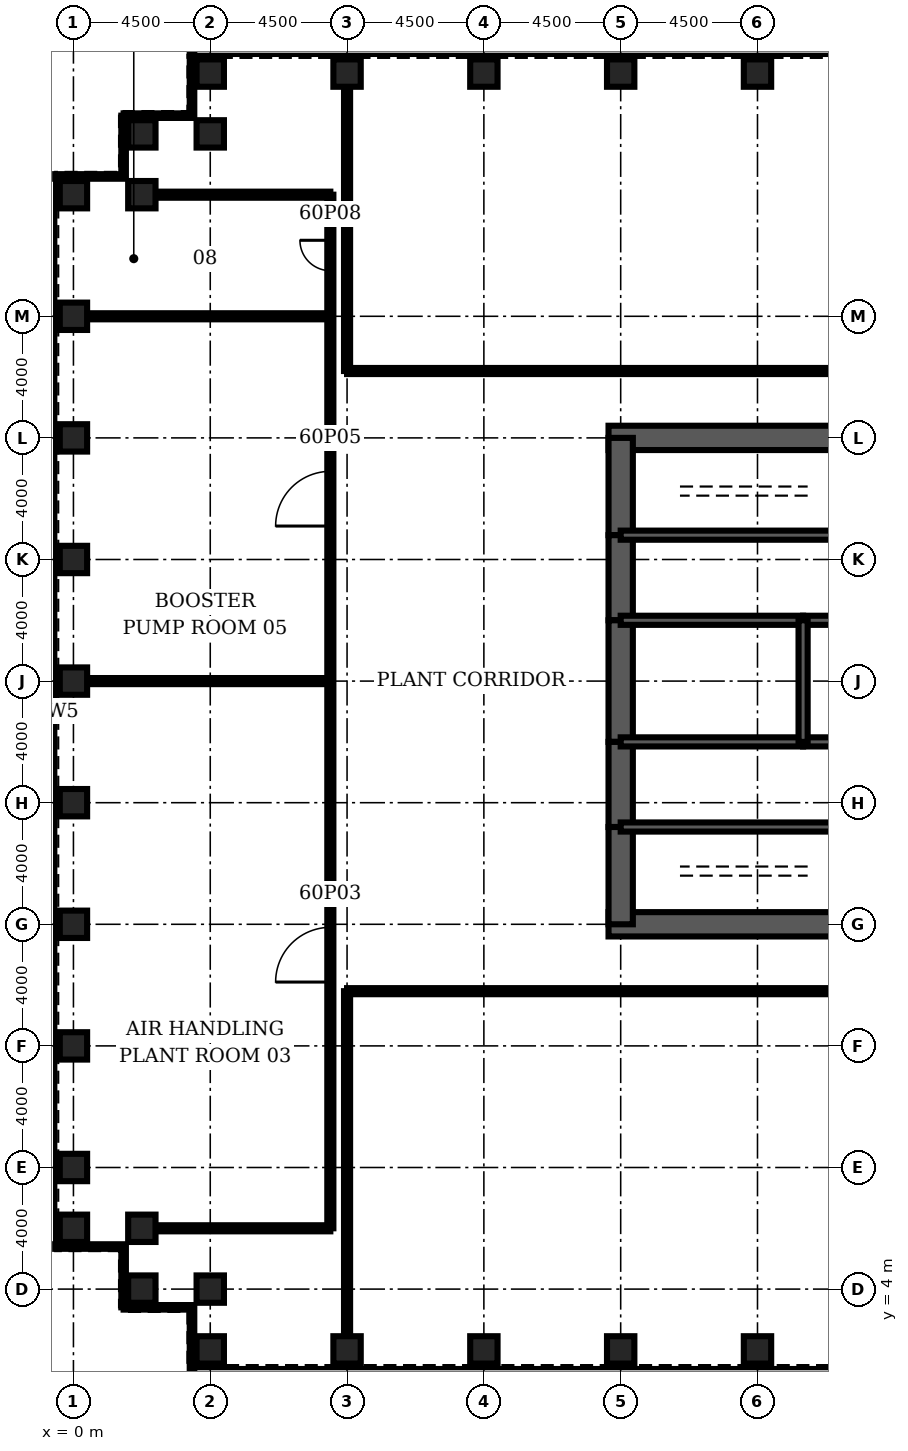
"""IFC4 building model, lengths in metres.
Left out: names, types, materials, properties, quantities, classifications, styles, units other than length and angle.
Written with IfcOpenShell. Run it as: python <this file> out.ifc"""

import sys

from ifc_helpers import new_model, si_unit, direction, frame, frame_2d, origin, origin_2d, place, context, subcontext, project, spatial, rectangle, hollow_rectangle, extrude, element, fill, save


model = new_model("IFC4")
c1 = context("Model", 3, precision=1e-05, world=origin(), true_north=direction((0.0, 1.0)))
c2 = subcontext(c1, "Body", "Model", "MODEL_VIEW")
j1 = project(units=[si_unit("LENGTHUNIT", "METRE"), si_unit("PLANEANGLEUNIT", "RADIAN")], contexts=[c1])
p1 = place(None, origin())
s1 = spatial("IfcSite", under=j1, at=p1, CompositionType="ELEMENT")
p2 = place(p1, origin())
s2 = spatial("IfcBuilding", under=s1, at=p2, CompositionType="ELEMENT")
p3 = place(p2, frame((0.0, 0.0, 265.6)))
s3 = spatial("IfcBuildingStorey", under=s2, at=p3, CompositionType="ELEMENT", Elevation=265.6)
for number, where, z_axis, x_axis in (
    (1, (4.5, 2.0, 0.0), (0.0, 0.0, 1.0), (0.0, 1.0, 0.0)),
    (2, (9.0, 2.0, 0.0), (0.0, 0.0, 1.0), (0.0, 1.0, 0.0)),
    (3, (13.5, 2.0, 0.0), (0.0, 0.0, 1.0), (0.0, 1.0, 0.0)),
    (4, (18.0, 2.0, 0.0), (0.0, 0.0, 1.0), (0.0, 1.0, 0.0)),
    (5, (22.5, 2.0, 0.0), (0.0, 0.0, 1.0), (0.0, 1.0, 0.0)),
    (6, (22.5, 44.0, 0.0), (0.0, 0.0, 1.0), (0.0, 1.0, 0.0)),
    (7, (18.0, 44.0, 0.0), (0.0, 0.0, 1.0), (0.0, 1.0, 0.0)),
    (8, (13.5, 44.0, 0.0), (0.0, 0.0, 1.0), (0.0, 1.0, 0.0)),
    (9, (9.0, 44.0, 0.0), (0.0, 0.0, 1.0), (0.0, 1.0, 0.0)),
    (10, (4.5, 44.0, 0.0), (0.0, 0.0, 1.0), (0.0, 1.0, 0.0)),
    (11, (4.5, 42.0, 0.0), (0.0, 0.0, 1.0), (0.0, 1.0, 0.0)),
    (12, (2.25, 42.0, 0.0), (0.0, 0.0, 1.0), (1.0, 0.0, 0.0)),
    (13, (2.25, 40.0, 0.0), (0.0, 0.0, 1.0), (1.0, 0.0, 0.0)),
    (14, (0.0, 40.0, 0.0), (0.0, 0.0, 1.0), (1.0, 0.0, 0.0)),
    (15, (0.0, 36.0, 0.0), (0.0, 0.0, 1.0), (1.0, 0.0, 0.0)),
    (16, (0.0, 32.0, 0.0), (0.0, 0.0, 1.0), (1.0, 0.0, 0.0)),
    (17, (0.0, 28.0, 0.0), (0.0, 0.0, 1.0), (1.0, 0.0, 0.0)),
    (18, (0.0, 24.0, 0.0), (0.0, 0.0, 1.0), (1.0, 0.0, 0.0)),
    (19, (0.0, 20.0, 0.0), (0.0, 0.0, 1.0), (1.0, 0.0, 0.0)),
    (20, (0.0, 16.0, 0.0), (0.0, 0.0, 1.0), (1.0, 0.0, 0.0)),
    (21, (0.0, 12.0, 0.0), (0.0, 0.0, 1.0), (1.0, 0.0, 0.0)),
    (22, (0.0, 8.0, 0.0), (0.0, 0.0, 1.0), (1.0, 0.0, 0.0)),
    (23, (0.0, 6.0, 0.0), (0.0, 0.0, 1.0), (1.0, 0.0, 0.0)),
    (24, (2.25, 6.0, 0.0), (0.0, 0.0, 1.0), (1.0, 0.0, 0.0)),
    (25, (2.25, 4.0, 0.0), (0.0, 0.0, 1.0), (1.0, 0.0, 0.0)),
    (26, (4.5, 4.0, 0.0), (0.0, 0.0, 1.0), (0.0, 1.0, 0.0)),
):
    element("IfcColumn", number, at=place(p3, frame(where, z_axis=z_axis, x_axis=x_axis)), inside=s3, PredefinedType="COLUMN", context=c2, shape_type="SweptSolid", body=[
        extrude(hollow_rectangle(XDim=0.9, YDim=0.9, WallThickness=0.07, at=origin_2d()), origin(), (0.0, 0.0, 1.0), 5.5),
    ])
for number, where, z_axis, x_axis in (
    (27, (17.6, 16.0, 0.0), (0.0, 0.0, 1.0), (1.0, 0.0, 0.0)),
    (28, (27.0, 32.0, 0.0), (0.0, 0.0, 1.0), (-1.0, 0.0, 0.0)),
):
    element("IfcWall", number, at=place(p3, frame(where, z_axis=z_axis, x_axis=x_axis)), inside=s3, PredefinedType="SHEAR", context=c2, shape_type="SweptSolid", body=[
        extrude(rectangle(XDim=9.4, YDim=0.8, at=frame_2d((4.7, 0.0))), origin(), (0.0, 0.0, 1.0), 5.5),
    ])
p4 = place(p3, frame((18.0, 32.0, 0.0), z_axis=(0.0, 0.0, 1.0), x_axis=(0.0, -1.0, 0.0)))
e29 = element("IfcWall", 29, at=p4, inside=s3, PredefinedType="SHEAR", context=c2, shape_type="SweptSolid", body=[
    extrude(rectangle(XDim=3.2, YDim=0.8, at=frame_2d((1.6, 0.0))), origin(), (0.0, 0.0, 1.0), 5.5),
])
p5 = place(p3, frame((18.0, 28.8, 0.0), z_axis=(0.0, 0.0, 1.0), x_axis=(0.0, -1.0, 0.0)))
e30 = element("IfcWall", 30, at=p5, inside=s3, PredefinedType="SHEAR", context=c2, shape_type="SweptSolid", body=[
    extrude(rectangle(XDim=2.8, YDim=0.8, at=frame_2d((1.4, 0.0))), origin(), (0.0, 0.0, 1.0), 5.5),
])
p6 = place(p5, frame((0.4, 0.0, 0.0)))
e31 = element("IfcOpeningElement", 31, at=p6, cuts=e30, PredefinedType="OPENING", context=c2, shape_type="SweptSolid", body=[
    extrude(rectangle(XDim=1.8, YDim=2.1, at=frame_2d((0.9, 1.05))), frame((0.0, 0.41, 0.0), z_axis=(0.0, -1.0, 0.0), x_axis=(1.0, 0.0, 0.0)), (0.0, 0.0, 1.0), 0.82),
])
p7 = place(p3, frame((18.0, 26.0, 0.0), z_axis=(0.0, 0.0, 1.0), x_axis=(0.0, -1.0, 0.0)))
e32 = element("IfcWall", 32, at=p7, inside=s3, PredefinedType="SHEAR", context=c2, shape_type="SweptSolid", body=[
    extrude(rectangle(XDim=4.0, YDim=0.8, at=frame_2d((2.0, 0.0))), origin(), (0.0, 0.0, 1.0), 5.5),
])
p8 = place(p3, frame((18.0, 22.0, 0.0), z_axis=(0.0, 0.0, 1.0), x_axis=(0.0, -1.0, 0.0)))
e33 = element("IfcWall", 33, at=p8, inside=s3, PredefinedType="SHEAR", context=c2, shape_type="SweptSolid", body=[
    extrude(rectangle(XDim=2.8, YDim=0.8, at=frame_2d((1.4, 0.0))), origin(), (0.0, 0.0, 1.0), 5.5),
])
p9 = place(p8, frame((0.6, 0.0, 0.0)))
e34 = element("IfcOpeningElement", 34, at=p9, cuts=e33, PredefinedType="OPENING", context=c2, shape_type="SweptSolid", body=[
    extrude(rectangle(XDim=1.8, YDim=2.1, at=frame_2d((0.9, 1.05))), frame((0.0, 0.41, 0.0), z_axis=(0.0, -1.0, 0.0), x_axis=(1.0, 0.0, 0.0)), (0.0, 0.0, 1.0), 0.82),
])
p10 = place(p3, frame((18.0, 19.2, 0.0), z_axis=(0.0, 0.0, 1.0), x_axis=(0.0, -1.0, 0.0)))
e35 = element("IfcWall", 35, at=p10, inside=s3, PredefinedType="SHEAR", context=c2, shape_type="SweptSolid", body=[
    extrude(rectangle(XDim=3.2, YDim=0.8, at=frame_2d((1.6, 0.0))), origin(), (0.0, 0.0, 1.0), 5.5),
])
p11 = place(p3, frame((18.0, 19.2, 0.0), z_axis=(0.0, 0.0, 1.0), x_axis=(1.0, 0.0, 0.0)))
e36 = element("IfcWall", 36, at=p11, inside=s3, PredefinedType="SOLIDWALL", context=c2, shape_type="SweptSolid", body=[
    extrude(rectangle(XDim=9.0, YDim=0.3, at=frame_2d((4.5, 0.0))), origin(), (0.0, 0.0, 1.0), 5.5),
])
p12 = place(p11, frame((0.65, 0.0, 0.0)))
e37 = element("IfcOpeningElement", 37, at=p12, cuts=e36, PredefinedType="OPENING", context=c2, shape_type="SweptSolid", body=[
    extrude(rectangle(XDim=1.0, YDim=2.1, at=frame_2d((0.5, 1.05))), frame((0.0, 0.16, 0.0), z_axis=(0.0, -1.0, 0.0), x_axis=(1.0, 0.0, 0.0)), (0.0, 0.0, 1.0), 0.32),
])
p13 = place(p3, frame((18.0, 28.8, 0.0), z_axis=(0.0, 0.0, 1.0), x_axis=(1.0, 0.0, 0.0)))
e38 = element("IfcWall", 38, at=p13, inside=s3, PredefinedType="SOLIDWALL", context=c2, shape_type="SweptSolid", body=[
    extrude(rectangle(XDim=9.0, YDim=0.3, at=frame_2d((4.5, 0.0))), origin(), (0.0, 0.0, 1.0), 5.5),
])
p14 = place(p13, frame((0.65, 0.0, 0.0)))
e39 = element("IfcOpeningElement", 39, at=p14, cuts=e38, PredefinedType="OPENING", context=c2, shape_type="SweptSolid", body=[
    extrude(rectangle(XDim=1.0, YDim=2.1, at=frame_2d((0.5, 1.05))), frame((0.0, 0.16, 0.0), z_axis=(0.0, -1.0, 0.0), x_axis=(1.0, 0.0, 0.0)), (0.0, 0.0, 1.0), 0.32),
])
p15 = place(p3, frame((18.0, 22.0, 0.0), z_axis=(0.0, 0.0, 1.0), x_axis=(1.0, 0.0, 0.0)))
e40 = element("IfcWall", 40, at=p15, inside=s3, PredefinedType="SOLIDWALL", context=c2, shape_type="SweptSolid", body=[
    extrude(rectangle(XDim=6.0, YDim=0.3, at=frame_2d((3.0, 0.0))), origin(), (0.0, 0.0, 1.0), 5.5),
])
p16 = place(p15, frame((2.0, 0.0, 0.0)))
e41 = element("IfcOpeningElement", 41, at=p16, cuts=e40, PredefinedType="OPENING", context=c2, shape_type="SweptSolid", body=[
    extrude(rectangle(XDim=1.0, YDim=2.1, at=frame_2d((0.5, 1.05))), frame((0.0, 0.16, 0.0), z_axis=(0.0, -1.0, 0.0), x_axis=(1.0, 0.0, 0.0)), (0.0, 0.0, 1.0), 0.32),
])
p17 = place(p3, frame((24.0, 22.0, 0.0), z_axis=(0.0, 0.0, 1.0), x_axis=(1.0, 0.0, 0.0)))
e42 = element("IfcWall", 42, at=p17, inside=s3, PredefinedType="SOLIDWALL", context=c2, shape_type="SweptSolid", body=[
    extrude(rectangle(XDim=3.0, YDim=0.3, at=frame_2d((1.5, 0.0))), origin(), (0.0, 0.0, 1.0), 5.5),
])
p18 = place(p17, frame((1.0, 0.0, 0.0)))
e43 = element("IfcOpeningElement", 43, at=p18, cuts=e42, PredefinedType="OPENING", context=c2, shape_type="SweptSolid", body=[
    extrude(rectangle(XDim=1.0, YDim=2.1, at=frame_2d((0.5, 1.05))), frame((0.0, 0.16, 0.0), z_axis=(0.0, -1.0, 0.0), x_axis=(1.0, 0.0, 0.0)), (0.0, 0.0, 1.0), 0.32),
])
p19 = place(p3, frame((18.0, 26.0, 0.0), z_axis=(0.0, 0.0, 1.0), x_axis=(1.0, 0.0, 0.0)))
e44 = element("IfcWall", 44, at=p19, inside=s3, PredefinedType="SOLIDWALL", context=c2, shape_type="SweptSolid", body=[
    extrude(rectangle(XDim=6.0, YDim=0.3, at=frame_2d((3.0, 0.0))), origin(), (0.0, 0.0, 1.0), 5.5),
])
p20 = place(p3, frame((24.0, 26.0, 0.0), z_axis=(0.0, 0.0, 1.0), x_axis=(1.0, 0.0, 0.0)))
e45 = element("IfcWall", 45, at=p20, inside=s3, PredefinedType="SOLIDWALL", context=c2, shape_type="SweptSolid", body=[
    extrude(rectangle(XDim=3.0, YDim=0.3, at=frame_2d((1.5, 0.0))), origin(), (0.0, 0.0, 1.0), 5.5),
])
p21 = place(p3, frame((24.0, 22.0, 0.0), z_axis=(0.0, 0.0, 1.0), x_axis=(0.0, 1.0, 0.0)))
e46 = element("IfcWall", 46, at=p21, inside=s3, PredefinedType="SOLIDWALL", context=c2, shape_type="SweptSolid", body=[
    extrude(rectangle(XDim=4.0, YDim=0.3, at=frame_2d((2.0, 0.0))), origin(), (0.0, 0.0, 1.0), 5.5),
])
p22 = place(p3, frame((2.7, 6.0, 0.0), z_axis=(0.0, 0.0, 1.0), x_axis=(1.0, 0.0, 0.0)))
e47 = element("IfcWall", 47, at=p22, inside=s3, PredefinedType="PARTITIONING", context=c2, shape_type="SweptSolid", body=[
    extrude(rectangle(XDim=5.75, YDim=0.2, at=frame_2d((2.875, 0.0))), origin(), (0.0, 0.0, 1.0), 5.34),
])
p23 = place(p3, frame((9.0, 13.8, 0.0), z_axis=(0.0, 0.0, 1.0), x_axis=(1.0, 0.0, 0.0)))
e48 = element("IfcWall", 48, at=p23, inside=s3, PredefinedType="PARTITIONING", context=c2, shape_type="SweptSolid", body=[
    extrude(rectangle(XDim=54.0, YDim=0.2, at=frame_2d((27.0, 0.0))), origin(), (0.0, 0.0, 1.0), 5.34),
])
p24 = place(p23, frame((26.1, 0.0, 0.0)))
e49 = element("IfcOpeningElement", 49, at=p24, cuts=e48, PredefinedType="OPENING", context=c2, shape_type="SweptSolid", body=[
    extrude(rectangle(XDim=1.8, YDim=2.1, at=frame_2d((0.9, 1.05))), frame((0.0, 0.11, 0.0), z_axis=(0.0, -1.0, 0.0), x_axis=(1.0, 0.0, 0.0)), (0.0, 0.0, 1.0), 0.22),
])
p25 = place(p3, frame((0.45, 24.0, 0.0), z_axis=(0.0, 0.0, 1.0), x_axis=(1.0, 0.0, 0.0)))
e50 = element("IfcWall", 50, at=p25, inside=s3, PredefinedType="PARTITIONING", context=c2, shape_type="SweptSolid", body=[
    extrude(rectangle(XDim=8.0, YDim=0.2, at=frame_2d((4.0, 0.0))), origin(), (0.0, 0.0, 1.0), 5.34),
])
p26 = place(p3, frame((9.0, 34.2, 0.0), z_axis=(0.0, 0.0, 1.0), x_axis=(1.0, 0.0, 0.0)))
e51 = element("IfcWall", 51, at=p26, inside=s3, PredefinedType="PARTITIONING", context=c2, shape_type="SweptSolid", body=[
    extrude(rectangle(XDim=54.0, YDim=0.2, at=frame_2d((27.0, 0.0))), origin(), (0.0, 0.0, 1.0), 5.34),
])
p27 = place(p26, frame((26.1, 0.0, 0.0)))
e52 = element("IfcOpeningElement", 52, at=p27, cuts=e51, PredefinedType="OPENING", context=c2, shape_type="SweptSolid", body=[
    extrude(rectangle(XDim=1.8, YDim=2.1, at=frame_2d((0.9, 1.05))), frame((0.0, 0.11, 0.0), z_axis=(0.0, -1.0, 0.0), x_axis=(1.0, 0.0, 0.0)), (0.0, 0.0, 1.0), 0.22),
])
p28 = place(p3, frame((0.45, 36.0, 0.0), z_axis=(0.0, 0.0, 1.0), x_axis=(1.0, 0.0, 0.0)))
e53 = element("IfcWall", 53, at=p28, inside=s3, PredefinedType="PARTITIONING", context=c2, shape_type="SweptSolid", body=[
    extrude(rectangle(XDim=8.0, YDim=0.2, at=frame_2d((4.0, 0.0))), origin(), (0.0, 0.0, 1.0), 5.34),
])
p29 = place(p3, frame((2.7, 40.0, 0.0), z_axis=(0.0, 0.0, 1.0), x_axis=(1.0, 0.0, 0.0)))
e54 = element("IfcWall", 54, at=p29, inside=s3, PredefinedType="PARTITIONING", context=c2, shape_type="SweptSolid", body=[
    extrude(rectangle(XDim=5.75, YDim=0.2, at=frame_2d((2.875, 0.0))), origin(), (0.0, 0.0, 1.0), 5.34),
])
p30 = place(p3, frame((8.45, 6.0, 0.0), z_axis=(0.0, 0.0, 1.0), x_axis=(0.0, 1.0, 0.0)))
e55 = element("IfcWall", 55, at=p30, inside=s3, PredefinedType="PARTITIONING", context=c2, shape_type="SweptSolid", body=[
    extrude(rectangle(XDim=34.0, YDim=0.2, at=frame_2d((17.0, 0.0))), origin(), (0.0, 0.0, 1.0), 5.34),
])
p31 = place(p30, frame((8.1, 0.0, 0.0)))
e56 = element("IfcOpeningElement", 56, at=p31, cuts=e55, PredefinedType="OPENING", context=c2, shape_type="SweptSolid", body=[
    extrude(rectangle(XDim=1.8, YDim=2.1, at=frame_2d((0.9, 1.05))), frame((0.0, 0.11, 0.0), z_axis=(0.0, -1.0, 0.0), x_axis=(1.0, 0.0, 0.0)), (0.0, 0.0, 1.0), 0.22),
])
p32 = place(p30, frame((23.1, 0.0, 0.0)))
e57 = element("IfcOpeningElement", 57, at=p32, cuts=e55, PredefinedType="OPENING", context=c2, shape_type="SweptSolid", body=[
    extrude(rectangle(XDim=1.8, YDim=2.1, at=frame_2d((0.9, 1.05))), frame((0.0, 0.11, 0.0), z_axis=(0.0, -1.0, 0.0), x_axis=(1.0, 0.0, 0.0)), (0.0, 0.0, 1.0), 0.22),
])
p33 = place(p30, frame((31.5, 0.0, 0.0)))
e58 = element("IfcOpeningElement", 58, at=p33, cuts=e55, PredefinedType="OPENING", context=c2, shape_type="SweptSolid", body=[
    extrude(rectangle(XDim=1.0, YDim=2.1, at=frame_2d((0.5, 1.05))), frame((0.0, 0.11, 0.0), z_axis=(0.0, -1.0, 0.0), x_axis=(1.0, 0.0, 0.0)), (0.0, 0.0, 1.0), 0.22),
])
p34 = place(p3, frame((9.0, 2.45, 0.0), z_axis=(0.0, 0.0, 1.0), x_axis=(0.0, 1.0, 0.0)))
e59 = element("IfcWall", 59, at=p34, inside=s3, PredefinedType="PARTITIONING", context=c2, shape_type="SweptSolid", body=[
    extrude(rectangle(XDim=11.35, YDim=0.2, at=frame_2d((5.675, 0.0))), origin(), (0.0, 0.0, 1.0), 5.34),
])
p35 = place(p3, frame((9.0, 34.2, 0.0), z_axis=(0.0, 0.0, 1.0), x_axis=(0.0, 1.0, 0.0)))
e60 = element("IfcWall", 60, at=p35, inside=s3, PredefinedType="PARTITIONING", context=c2, shape_type="SweptSolid", body=[
    extrude(rectangle(XDim=9.35, YDim=0.2, at=frame_2d((4.675, 0.0))), origin(), (0.0, 0.0, 1.0), 5.34),
])
p36 = place(p3, frame((3.9, 44.6, 0.0), z_axis=(0.0, 0.0, 1.0), x_axis=(0.0, -1.0, 0.0)))
e61 = element("IfcWall", 61, at=p36, inside=s3, PredefinedType="ELEMENTEDWALL", context=c2, shape_type="SweptSolid", body=[
    extrude(rectangle(XDim=2.0, YDim=0.15, at=frame_2d((1.0, 0.0))), origin(), (0.0, 0.0, 1.0), 5.34),
])
p37 = place(p3, frame((3.9, 42.6, 0.0), z_axis=(0.0, 0.0, 1.0), x_axis=(-1.0, 0.0, 0.0)))
e62 = element("IfcWall", 62, at=p37, inside=s3, PredefinedType="ELEMENTEDWALL", context=c2, shape_type="SweptSolid", body=[
    extrude(rectangle(XDim=2.25, YDim=0.15, at=frame_2d((1.125, 0.0))), origin(), (0.0, 0.0, 1.0), 5.34),
])
p38 = place(p3, frame((1.65, 42.6, 0.0), z_axis=(0.0, 0.0, 1.0), x_axis=(0.0, -1.0, 0.0)))
e63 = element("IfcWall", 63, at=p38, inside=s3, PredefinedType="ELEMENTEDWALL", context=c2, shape_type="SweptSolid", body=[
    extrude(rectangle(XDim=2.0, YDim=0.15, at=frame_2d((1.0, 0.0))), origin(), (0.0, 0.0, 1.0), 5.34),
])
for number, where, z_axis, x_axis in (
    (64, (1.65, 40.6, 0.0), (0.0, 0.0, 1.0), (-1.0, 0.0, 0.0)),
    (65, (-0.6, 5.4, 0.0), (0.0, 0.0, 1.0), (1.0, 0.0, 0.0)),
):
    element("IfcWall", number, at=place(p3, frame(where, z_axis=z_axis, x_axis=x_axis)), inside=s3, PredefinedType="ELEMENTEDWALL", context=c2, shape_type="SweptSolid", body=[
        extrude(rectangle(XDim=2.25, YDim=0.15, at=frame_2d((1.125, 0.0))), origin(), (0.0, 0.0, 1.0), 5.34),
    ])
p39 = place(p3, frame((1.65, 5.4, 0.0), z_axis=(0.0, 0.0, 1.0), x_axis=(0.0, -1.0, 0.0)))
e66 = element("IfcWall", 66, at=p39, inside=s3, PredefinedType="ELEMENTEDWALL", context=c2, shape_type="SweptSolid", body=[
    extrude(rectangle(XDim=2.0, YDim=0.15, at=frame_2d((1.0, 0.0))), origin(), (0.0, 0.0, 1.0), 5.34),
])
p40 = place(p3, frame((1.65, 3.4, 0.0), z_axis=(0.0, 0.0, 1.0), x_axis=(1.0, 0.0, 0.0)))
e67 = element("IfcWall", 67, at=p40, inside=s3, PredefinedType="ELEMENTEDWALL", context=c2, shape_type="SweptSolid", body=[
    extrude(rectangle(XDim=2.25, YDim=0.15, at=frame_2d((1.125, 0.0))), origin(), (0.0, 0.0, 1.0), 5.34),
])
p41 = place(p3, frame((3.9, 3.4, 0.0), z_axis=(0.0, 0.0, 1.0), x_axis=(0.0, -1.0, 0.0)))
e68 = element("IfcWall", 68, at=p41, inside=s3, PredefinedType="ELEMENTEDWALL", context=c2, shape_type="SweptSolid", body=[
    extrude(rectangle(XDim=2.0, YDim=0.15, at=frame_2d((1.0, 0.0))), origin(), (0.0, 0.0, 1.0), 5.34),
])
p42 = place(p31, origin())
e69 = element("IfcDoor", 69, at=p42, inside=s3, OperationType="SINGLE_SWING_LEFT", PredefinedType="DOOR", context=c2, shape_type="SweptSolid", body=[
    extrude(rectangle(XDim=1.8, YDim=2.1, at=frame_2d((0.9, 1.05))), frame((0.0, 0.025, 0.0), z_axis=(0.0, -1.0, 0.0), x_axis=(1.0, 0.0, 0.0)), (0.0, 0.0, 1.0), 0.05),
])
fill(e56, e69)
p43 = place(p32, origin())
e70 = element("IfcDoor", 70, at=p43, inside=s3, OperationType="SINGLE_SWING_LEFT", PredefinedType="DOOR", context=c2, shape_type="SweptSolid", body=[
    extrude(rectangle(XDim=1.8, YDim=2.1, at=frame_2d((0.9, 1.05))), frame((0.0, 0.025, 0.0), z_axis=(0.0, -1.0, 0.0), x_axis=(1.0, 0.0, 0.0)), (0.0, 0.0, 1.0), 0.05),
])
fill(e57, e70)
p44 = place(p33, origin())
e71 = element("IfcDoor", 71, at=p44, inside=s3, OperationType="SINGLE_SWING_RIGHT", PredefinedType="DOOR", context=c2, shape_type="SweptSolid", body=[
    extrude(rectangle(XDim=1.0, YDim=2.1, at=frame_2d((0.5, 1.05))), frame((0.0, 0.025, 0.0), z_axis=(0.0, -1.0, 0.0), x_axis=(1.0, 0.0, 0.0)), (0.0, 0.0, 1.0), 0.05),
])
fill(e58, e71)
p45 = place(p12, origin())
e72 = element("IfcDoor", 72, at=p45, inside=s3, OperationType="SINGLE_SWING_LEFT", PredefinedType="DOOR", context=c2, shape_type="SweptSolid", body=[
    extrude(rectangle(XDim=1.0, YDim=2.1, at=frame_2d((0.5, 1.05))), frame((0.0, 0.025, 0.0), z_axis=(0.0, -1.0, 0.0), x_axis=(1.0, 0.0, 0.0)), (0.0, 0.0, 1.0), 0.05),
])
fill(e37, e72)
p46 = place(p14, origin())
e73 = element("IfcDoor", 73, at=p46, inside=s3, OperationType="SINGLE_SWING_LEFT", PredefinedType="DOOR", context=c2, shape_type="SweptSolid", body=[
    extrude(rectangle(XDim=1.0, YDim=2.1, at=frame_2d((0.5, 1.05))), frame((0.0, 0.025, 0.0), z_axis=(0.0, -1.0, 0.0), x_axis=(1.0, 0.0, 0.0)), (0.0, 0.0, 1.0), 0.05),
])
fill(e39, e73)
p47 = place(p9, origin())
e74 = element("IfcDoor", 74, at=p47, inside=s3, OperationType="SINGLE_SWING_LEFT", PredefinedType="DOOR", context=c2, shape_type="SweptSolid", body=[
    extrude(rectangle(XDim=1.8, YDim=2.1, at=frame_2d((0.9, 1.05))), frame((0.0, 0.4, 0.0), z_axis=(0.0, -1.0, 0.0), x_axis=(1.0, 0.0, 0.0)), (0.0, 0.0, 1.0), 0.8),
])
fill(e34, e74)
p48 = place(p6, origin())
e75 = element("IfcDoor", 75, at=p48, inside=s3, OperationType="SINGLE_SWING_LEFT", PredefinedType="DOOR", context=c2, shape_type="SweptSolid", body=[
    extrude(rectangle(XDim=1.8, YDim=2.1, at=frame_2d((0.9, 1.05))), frame((0.0, 0.4, 0.0), z_axis=(0.0, -1.0, 0.0), x_axis=(1.0, 0.0, 0.0)), (0.0, 0.0, 1.0), 0.8),
])
fill(e31, e75)
p49 = place(p16, origin())
e76 = element("IfcDoor", 76, at=p49, inside=s3, OperationType="SINGLE_SWING_LEFT", PredefinedType="DOOR", context=c2, shape_type="SweptSolid", body=[
    extrude(rectangle(XDim=1.0, YDim=2.1, at=frame_2d((0.5, 1.05))), frame((0.0, 0.025, 0.0), z_axis=(0.0, -1.0, 0.0), x_axis=(1.0, 0.0, 0.0)), (0.0, 0.0, 1.0), 0.05),
])
fill(e41, e76)
save(model, sys.argv[1])
